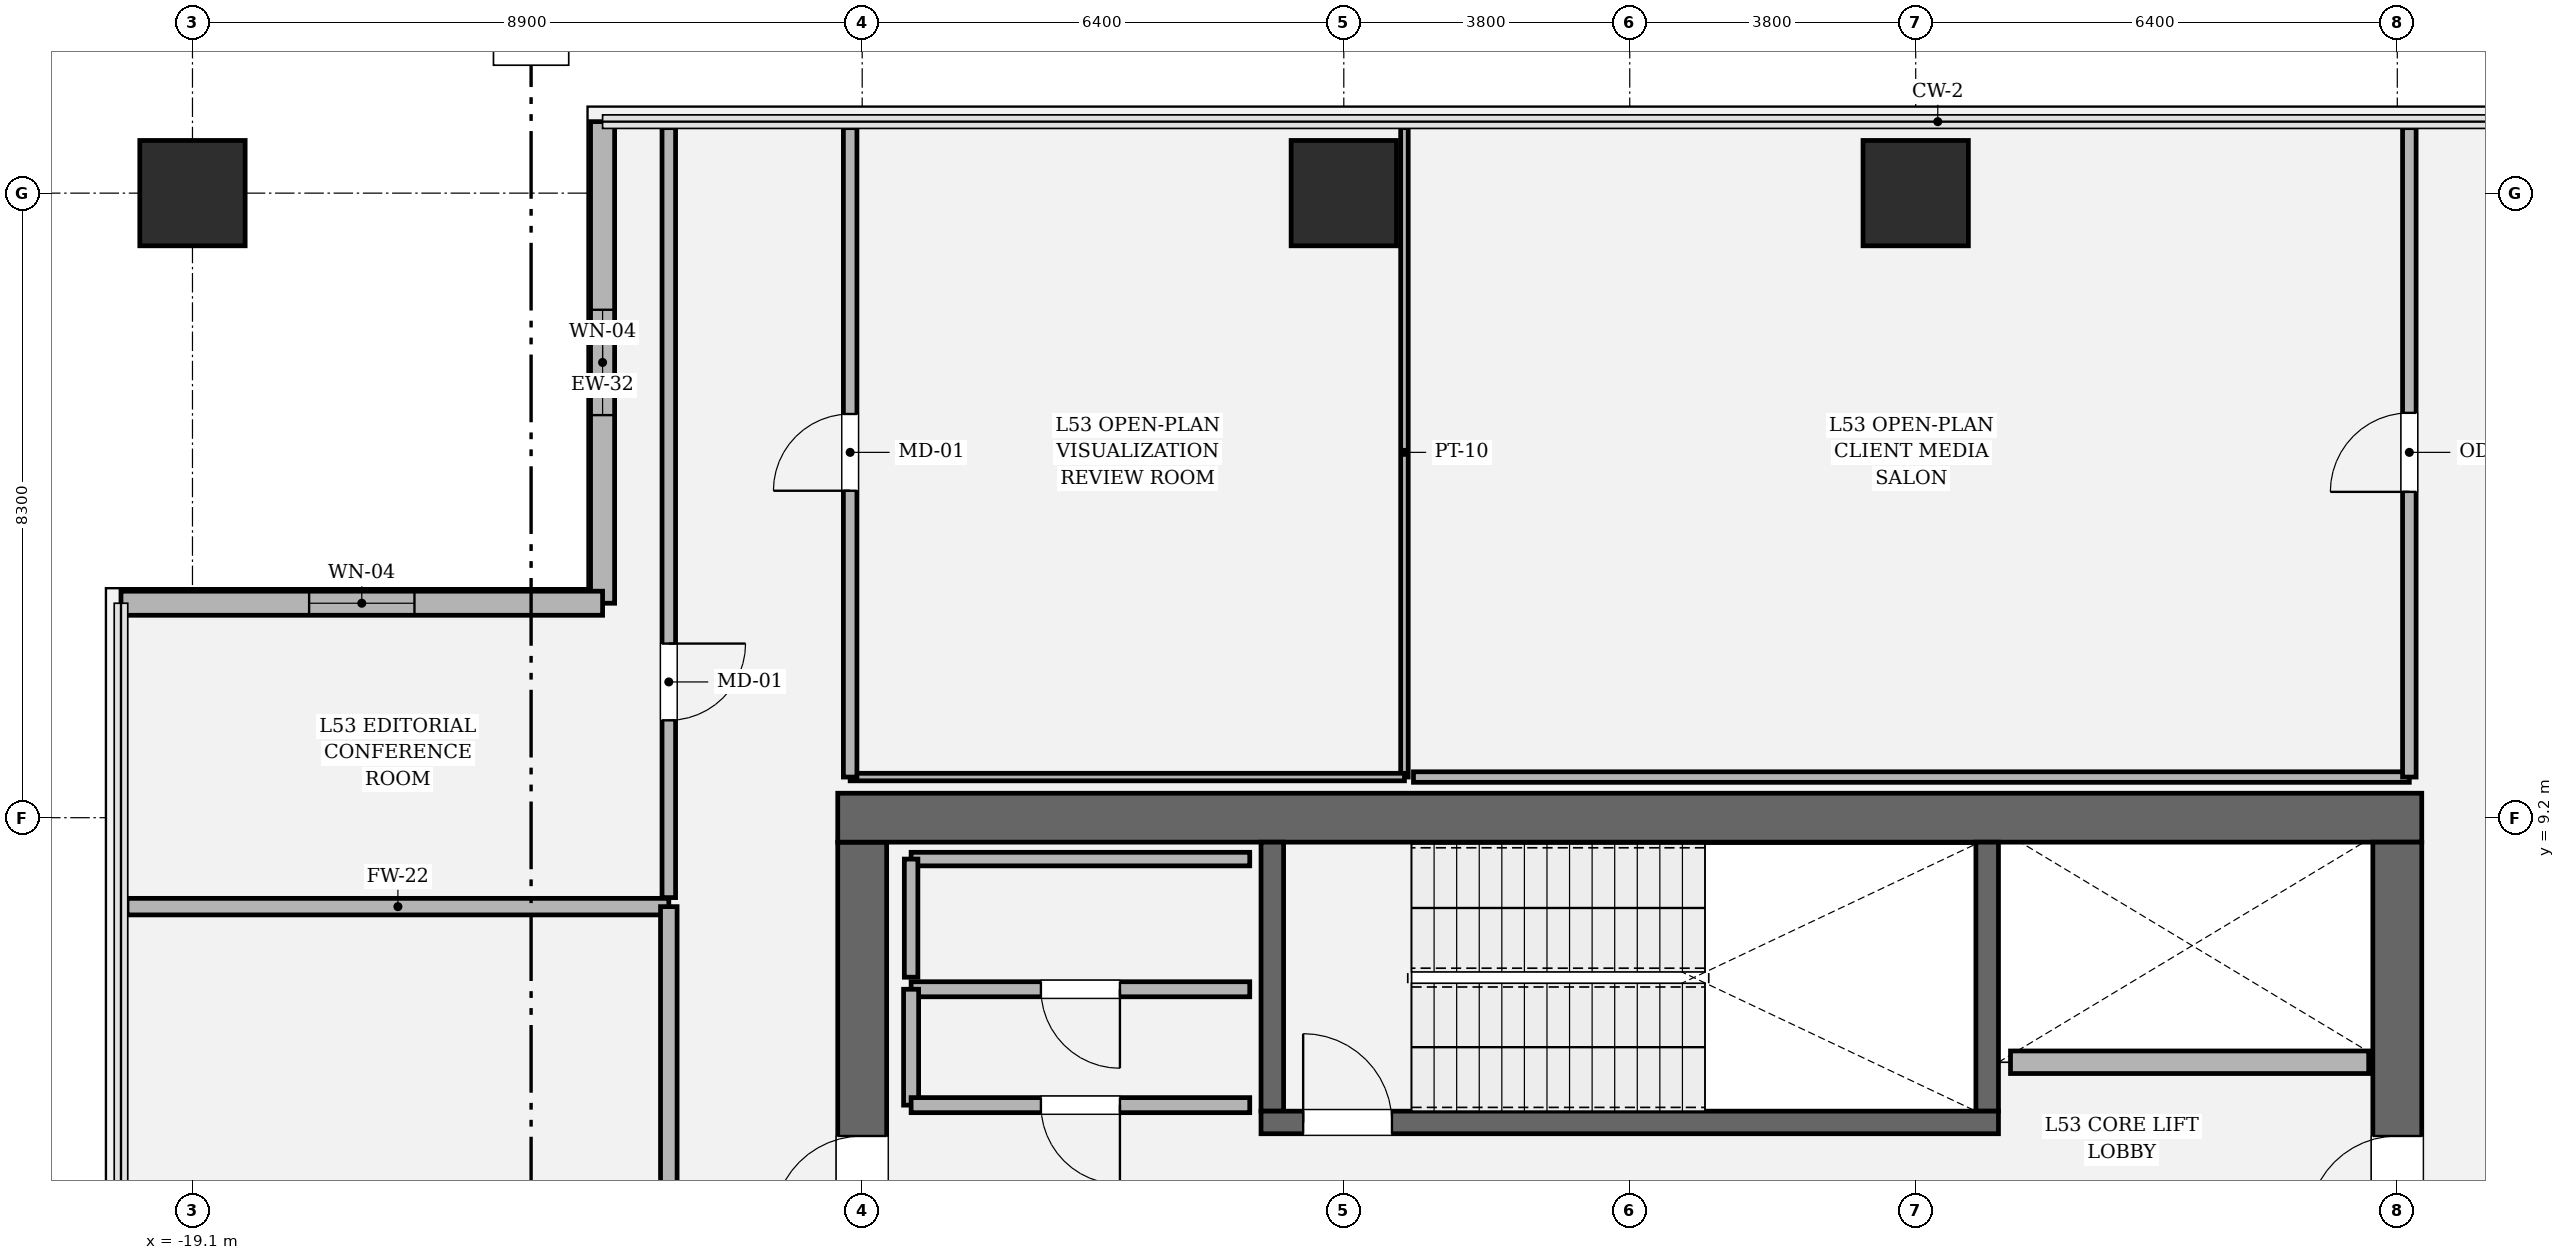
"""IFC4 building model, lengths in metres.
Left out: names, types, materials, properties, quantities, classifications, styles, units other than length and angle.
Written with IfcOpenShell. Run it as: python <this file> out.ifc"""

import sys

from ifc_helpers import new_model, si_unit, direction, frame, frame_2d, origin, origin_2d, place, context, subcontext, project, spatial, rectangle, hollow_rectangle, extrude, element, fill, save


model = new_model("IFC4")
c1 = context("Model", 3, precision=1e-05, world=origin(), true_north=direction((0.0, 1.0)))
c2 = subcontext(c1, "Body", "Model", "MODEL_VIEW")
j1 = project(units=[si_unit("LENGTHUNIT", "METRE"), si_unit("PLANEANGLEUNIT", "RADIAN")], contexts=[c1])
p1 = place(None, origin())
s1 = spatial("IfcSite", under=j1, at=p1, CompositionType="ELEMENT")
p2 = place(p1, origin())
s2 = spatial("IfcBuilding", under=s1, at=p2, CompositionType="ELEMENT")
p3 = place(p2, frame((0.0, 0.0, 224.85)))
s3 = spatial("IfcBuildingStorey", under=s2, at=p3, CompositionType="ELEMENT", Elevation=224.85)
p4 = place(p3, frame((-10.2, -8.875, 0.0), z_axis=(0.0, 0.0, 1.0), x_axis=(0.0, 1.0, 0.0)))
e1 = element("IfcWall", 1, at=p4, inside=s3, PredefinedType="SHEAR", context=c2, shape_type="SweptSolid", body=[
    extrude(rectangle(XDim=17.75, YDim=0.65, at=frame_2d((8.875, 0.0))), origin(), (0.0, 0.0, 1.0), 4.05),
])
p5 = place(p4, frame((12.665, 0.0, 0.0)))
e2 = element("IfcOpeningElement", 2, at=p5, cuts=e1, PredefinedType="OPENING", context=c2, shape_type="SweptSolid", body=[
    extrude(rectangle(XDim=1.18, YDim=2.2, at=frame_2d((0.59, 1.1))), frame((0.0, 0.335, 0.0), z_axis=(0.0, -1.0, 0.0), x_axis=(1.0, 0.0, 0.0)), (0.0, 0.0, 1.0), 0.67),
])
p6 = place(p3, frame((-10.525, 9.2, 0.0), z_axis=(0.0, 0.0, 1.0), x_axis=(1.0, 0.0, 0.0)))
e3 = element("IfcWall", 3, at=p6, inside=s3, PredefinedType="SHEAR", context=c2, shape_type="SweptSolid", body=[
    extrude(rectangle(XDim=21.05, YDim=0.65, at=frame_2d((10.525, 0.0))), origin(), (0.0, 0.0, 1.0), 4.05),
])
p7 = place(p3, frame((10.2, 8.875, 0.0), z_axis=(0.0, 0.0, 1.0), x_axis=(0.0, -1.0, 0.0)))
e4 = element("IfcWall", 4, at=p7, inside=s3, PredefinedType="SHEAR", context=c2, shape_type="SweptSolid", body=[
    extrude(rectangle(XDim=17.75, YDim=0.65, at=frame_2d((8.875, 0.0))), origin(), (0.0, 0.0, 1.0), 4.05),
])
p8 = place(p7, frame((3.905, 0.0, 0.0)))
e5 = element("IfcOpeningElement", 5, at=p8, cuts=e4, PredefinedType="OPENING", context=c2, shape_type="SweptSolid", body=[
    extrude(rectangle(XDim=1.18, YDim=2.2, at=frame_2d((0.59, 1.1))), frame((0.0, 0.335, 0.0), z_axis=(0.0, -1.0, 0.0), x_axis=(1.0, 0.0, 0.0)), (0.0, 0.0, 1.0), 0.67),
])
for number, where, z_axis, x_axis in (
    (6, (-4.75, 5.3, 0.0), (0.0, 0.0, 1.0), (0.0, 1.0, 0.0)),
    (7, (4.75, 8.875, 0.0), (0.0, 0.0, 1.0), (0.0, -1.0, 0.0)),
):
    element("IfcWall", number, at=place(p3, frame(where, z_axis=z_axis, x_axis=x_axis)), inside=s3, PredefinedType="SOLIDWALL", context=c2, shape_type="SweptSolid", body=[
        extrude(rectangle(XDim=3.575, YDim=0.3, at=frame_2d((1.788, 0.0))), origin(), (0.0, 0.0, 1.0), 4.05),
    ])
p9 = place(p3, frame((-4.9, 5.15, 0.0), z_axis=(0.0, 0.0, 1.0), x_axis=(1.0, 0.0, 0.0)))
e8 = element("IfcWall", 8, at=p9, inside=s3, PredefinedType="SOLIDWALL", context=c2, shape_type="SweptSolid", body=[
    extrude(rectangle(XDim=9.8, YDim=0.3, at=frame_2d((4.9, 0.0))), origin(), (0.0, 0.0, 1.0), 4.05),
])
p10 = place(p9, frame((0.56, 0.0, 0.0)))
e9 = element("IfcOpeningElement", 9, at=p10, cuts=e8, PredefinedType="OPENING", context=c2, shape_type="SweptSolid", body=[
    extrude(rectangle(XDim=1.18, YDim=2.2, at=frame_2d((0.59, 1.1))), frame((0.0, 0.16, 0.0), z_axis=(0.0, -1.0, 0.0), x_axis=(1.0, 0.0, 0.0)), (0.0, 0.0, 1.0), 0.32),
])
for number, where, z_axis, x_axis in (
    (10, (3.8, 17.5, 0.0), (0.0, 0.0, 1.0), (1.0, 0.0, 0.0)),
    (11, (-3.8, 17.5, 0.0), (0.0, 0.0, 1.0), (1.0, 0.0, 0.0)),
    (12, (-19.1, 17.5, 0.0), (0.0, 0.0, 1.0), (1.0, 0.0, 0.0)),
):
    element("IfcColumn", number, at=place(p3, frame(where, z_axis=z_axis, x_axis=x_axis)), inside=s3, PredefinedType="COLUMN", context=c2, shape_type="SweptSolid", body=[
        extrude(hollow_rectangle(XDim=1.4, YDim=1.4, WallThickness=0.042, at=origin_2d()), origin(), (0.0, 0.0, 1.0), 4.05),
    ])
p11 = place(p3, frame((-13.65, 18.45, 0.0), z_axis=(0.0, 0.0, 1.0), x_axis=(0.0, -1.0, 0.0)))
e13 = element("IfcWall", 13, at=p11, inside=s3, PredefinedType="SOLIDWALL", context=c2, shape_type="SweptSolid", body=[
    extrude(rectangle(XDim=6.4, YDim=0.32, at=frame_2d((3.2, 0.0))), origin(), (0.0, 0.0, 1.0), 3.174),
])
p12 = place(p11, frame((2.5, 0.0, 0.734)))
e14 = element("IfcOpeningElement", 14, at=p12, cuts=e13, PredefinedType="OPENING", context=c2, shape_type="SweptSolid", body=[
    extrude(rectangle(XDim=1.4, YDim=2.2, at=frame_2d((0.7, 1.1))), frame((0.0, 0.17, 0.0), z_axis=(0.0, -1.0, 0.0), x_axis=(1.0, 0.0, 0.0)), (0.0, 0.0, 1.0), 0.34),
])
p13 = place(p3, frame((-13.65, 12.05, 0.0), z_axis=(0.0, 0.0, 1.0), x_axis=(-1.0, 0.0, 0.0)))
e15 = element("IfcWall", 15, at=p13, inside=s3, PredefinedType="SOLIDWALL", context=c2, shape_type="SweptSolid", body=[
    extrude(rectangle(XDim=6.4, YDim=0.32, at=frame_2d((3.2, 0.0))), origin(), (0.0, 0.0, 1.0), 3.174),
])
p14 = place(p13, frame((2.5, 0.0, 0.734)))
e16 = element("IfcOpeningElement", 16, at=p14, cuts=e15, PredefinedType="OPENING", context=c2, shape_type="SweptSolid", body=[
    extrude(rectangle(XDim=1.4, YDim=2.2, at=frame_2d((0.7, 1.1))), frame((0.0, 0.17, 0.0), z_axis=(0.0, -1.0, 0.0), x_axis=(1.0, 0.0, 0.0)), (0.0, 0.0, 1.0), 0.34),
])
p15 = place(p3, frame((5.06, 5.95, 0.0), z_axis=(0.0, 0.0, 1.0), x_axis=(1.0, 0.0, 0.0)))
e17 = element("IfcWall", 17, at=p15, inside=s3, PredefinedType="SOLIDWALL", context=c2, shape_type="SweptSolid", body=[
    extrude(rectangle(XDim=4.76, YDim=0.3, at=frame_2d((2.38, 0.0))), origin(), (0.0, 0.0, 1.0), 3.83),
])
p16 = place(p3, frame((-5.05, 6.92, 0.0), z_axis=(0.0, 0.0, 1.0), x_axis=(-1.0, 0.0, 0.0)))
e18 = element("IfcWall", 18, at=p16, inside=s3, PredefinedType="SOLIDWALL", context=c2, shape_type="SweptSolid", body=[
    extrude(rectangle(XDim=4.5, YDim=0.2, at=frame_2d((2.25, 0.0))), origin(), (0.0, 0.0, 1.0), 3.83),
])
p17 = place(p16, frame((1.725, 0.0, 0.0)))
e19 = element("IfcOpeningElement", 19, at=p17, cuts=e18, PredefinedType="OPENING", context=c2, shape_type="SweptSolid", body=[
    extrude(rectangle(XDim=1.05, YDim=2.2, at=frame_2d((0.525, 1.1))), frame((0.0, 0.11, 0.0), z_axis=(0.0, -1.0, 0.0), x_axis=(1.0, 0.0, 0.0)), (0.0, 0.0, 1.0), 0.22),
])
p18 = place(p3, frame((-9.55, 6.92, 0.0), z_axis=(0.0, 0.0, 1.0), x_axis=(0.0, -1.0, 0.0)))
e20 = element("IfcWall", 20, at=p18, inside=s3, PredefinedType="SOLIDWALL", context=c2, shape_type="SweptSolid", body=[
    extrude(rectangle(XDim=1.54, YDim=0.2, at=frame_2d((0.77, 0.0))), origin(), (0.0, 0.0, 1.0), 3.83),
])
p19 = place(p3, frame((-9.55, 5.38, 0.0), z_axis=(0.0, 0.0, 1.0), x_axis=(1.0, 0.0, 0.0)))
e21 = element("IfcWall", 21, at=p19, inside=s3, PredefinedType="SOLIDWALL", context=c2, shape_type="SweptSolid", body=[
    extrude(rectangle(XDim=4.5, YDim=0.2, at=frame_2d((2.25, 0.0))), origin(), (0.0, 0.0, 1.0), 3.83),
])
p20 = place(p19, frame((1.725, 0.0, 0.0)))
e22 = element("IfcOpeningElement", 22, at=p20, cuts=e21, PredefinedType="OPENING", context=c2, shape_type="SweptSolid", body=[
    extrude(rectangle(XDim=1.05, YDim=2.2, at=frame_2d((0.525, 1.1))), frame((0.0, 0.11, 0.0), z_axis=(0.0, -1.0, 0.0), x_axis=(1.0, 0.0, 0.0)), (0.0, 0.0, 1.0), 0.22),
])
p21 = place(p3, frame((-5.05, 8.65, 0.0), z_axis=(0.0, 0.0, 1.0), x_axis=(-1.0, 0.0, 0.0)))
e23 = element("IfcWall", 23, at=p21, inside=s3, PredefinedType="PARTITIONING", context=c2, shape_type="SweptSolid", body=[
    extrude(rectangle(XDim=4.5, YDim=0.18, at=frame_2d((2.25, 0.0))), origin(), (0.0, 0.0, 1.0), 3.83),
])
p22 = place(p3, frame((-9.55, 8.65, 0.0), z_axis=(0.0, 0.0, 1.0), x_axis=(0.0, -1.0, 0.0)))
e24 = element("IfcWall", 24, at=p22, inside=s3, PredefinedType="PARTITIONING", context=c2, shape_type="SweptSolid", body=[
    extrude(rectangle(XDim=1.57, YDim=0.18, at=frame_2d((0.785, 0.0))), origin(), (0.0, 0.0, 1.0), 3.83),
])
p23 = place(p3, frame((-19.97, 8.018, 0.0), z_axis=(0.0, 0.0, 1.0), x_axis=(1.0, 0.0, 0.0)))
e25 = element("IfcWall", 25, at=p23, inside=s3, PredefinedType="SOLIDWALL", context=c2, shape_type="SweptSolid", body=[
    extrude(rectangle(XDim=7.2, YDim=0.22, at=frame_2d((3.6, 0.0))), origin(), (0.0, 0.0, 1.0), 3.174),
])
p24 = place(p3, frame((-12.77, 8.018, 0.0), z_axis=(0.0, 0.0, 1.0), x_axis=(0.0, -1.0, 0.0)))
e26 = element("IfcWall", 26, at=p24, inside=s3, PredefinedType="SOLIDWALL", context=c2, shape_type="SweptSolid", body=[
    extrude(rectangle(XDim=10.26, YDim=0.22, at=frame_2d((5.13, 0.0))), origin(), (0.0, 0.0, 1.0), 3.174),
])
p25 = place(p24, frame((4.58, 0.0, 0.0)))
e27 = element("IfcOpeningElement", 27, at=p25, cuts=e26, PredefinedType="OPENING", context=c2, shape_type="SweptSolid", body=[
    extrude(rectangle(XDim=1.1, YDim=2.2, at=frame_2d((0.55, 1.1))), frame((0.0, 0.12, 0.0), z_axis=(0.0, -1.0, 0.0), x_axis=(1.0, 0.0, 0.0)), (0.0, 0.0, 1.0), 0.24),
])
p26 = place(p3, frame((-12.77, 18.37, 0.0), z_axis=(0.0, 0.0, 1.0), x_axis=(0.0, -1.0, 0.0)))
e28 = element("IfcWall", 28, at=p26, inside=s3, PredefinedType="PARTITIONING", context=c2, shape_type="SweptSolid", body=[
    extrude(rectangle(XDim=10.232, YDim=0.18, at=frame_2d((5.116, 0.0))), origin(), (0.0, 0.0, 1.0), 3.174),
])
p27 = place(p26, frame((6.856, 0.0, 0.0)))
e29 = element("IfcOpeningElement", 29, at=p27, cuts=e28, PredefinedType="OPENING", context=c2, shape_type="SweptSolid", body=[
    extrude(rectangle(XDim=1.02, YDim=2.2, at=frame_2d((0.51, 1.1))), frame((0.0, 0.1, 0.0), z_axis=(0.0, -1.0, 0.0), x_axis=(1.0, 0.0, 0.0)), (0.0, 0.0, 1.0), 0.2),
])
p28 = place(p3, frame((-2.994, 18.37, 0.0), z_axis=(0.0, 0.0, 1.0), x_axis=(0.0, -1.0, 0.0)))
e30 = element("IfcWall", 30, at=p28, inside=s3, PredefinedType="PARTITIONING", context=c2, shape_type="SweptSolid", body=[
    extrude(rectangle(XDim=8.63, YDim=0.1, at=frame_2d((4.315, 0.0))), origin(), (0.0, 0.0, 1.0), 3.174),
])
p29 = place(p3, frame((-2.994, 9.74, 0.0), z_axis=(0.0, 0.0, 1.0), x_axis=(-1.0, 0.0, 0.0)))
e31 = element("IfcWall", 31, at=p29, inside=s3, PredefinedType="PARTITIONING", context=c2, shape_type="SweptSolid", body=[
    extrude(rectangle(XDim=7.366, YDim=0.1, at=frame_2d((3.683, 0.0))), origin(), (0.0, 0.0, 1.0), 3.174),
])
p30 = place(p3, frame((-10.36, 9.74, 0.0), z_axis=(0.0, 0.0, 1.0), x_axis=(0.0, 1.0, 0.0)))
e32 = element("IfcWall", 32, at=p30, inside=s3, PredefinedType="PARTITIONING", context=c2, shape_type="SweptSolid", body=[
    extrude(rectangle(XDim=8.63, YDim=0.18, at=frame_2d((4.315, 0.0))), origin(), (0.0, 0.0, 1.0), 3.174),
])
p31 = place(p30, frame((3.805, 0.0, 0.0)))
e33 = element("IfcOpeningElement", 33, at=p31, cuts=e32, PredefinedType="OPENING", context=c2, shape_type="SweptSolid", body=[
    extrude(rectangle(XDim=1.02, YDim=2.2, at=frame_2d((0.51, 1.1))), frame((0.0, 0.1, 0.0), z_axis=(0.0, -1.0, 0.0), x_axis=(1.0, 0.0, 0.0)), (0.0, 0.0, 1.0), 0.2),
])
p32 = place(p3, frame((10.36, 9.74, 0.0), z_axis=(0.0, 0.0, 1.0), x_axis=(-1.0, 0.0, 0.0)))
e34 = element("IfcWall", 34, at=p32, inside=s3, PredefinedType="PARTITIONING", context=c2, shape_type="SweptSolid", body=[
    extrude(rectangle(XDim=13.234, YDim=0.14, at=frame_2d((6.617, 0.0))), origin(), (0.0, 0.0, 1.0), 3.174),
])
p33 = place(p3, frame((10.36, 18.37, 0.0), z_axis=(0.0, 0.0, 1.0), x_axis=(0.0, -1.0, 0.0)))
e35 = element("IfcWall", 35, at=p33, inside=s3, PredefinedType="PARTITIONING", context=c2, shape_type="SweptSolid", body=[
    extrude(rectangle(XDim=8.63, YDim=0.18, at=frame_2d((4.315, 0.0))), origin(), (0.0, 0.0, 1.0), 3.174),
])
p34 = place(p33, frame((3.79, 0.0, 0.0)))
e36 = element("IfcOpeningElement", 36, at=p34, cuts=e35, PredefinedType="OPENING", context=c2, shape_type="SweptSolid", body=[
    extrude(rectangle(XDim=1.05, YDim=2.2, at=frame_2d((0.525, 1.1))), frame((0.0, 0.1, 0.0), z_axis=(0.0, -1.0, 0.0), x_axis=(1.0, 0.0, 0.0)), (0.0, 0.0, 1.0), 0.2),
])
p35 = place(p12, origin())
e37 = element("IfcWindow", 37, at=p35, inside=s3, PartitioningType="SINGLE_PANEL", PredefinedType="WINDOW", context=c2, shape_type="SweptSolid", body=[
    extrude(rectangle(XDim=1.4, YDim=2.2, at=frame_2d((0.7, 1.1))), frame((0.0, 0.03, 0.0), z_axis=(0.0, -1.0, 0.0), x_axis=(1.0, 0.0, 0.0)), (0.0, 0.0, 1.0), 0.06),
])
fill(e14, e37)
p36 = place(p14, origin())
e38 = element("IfcWindow", 38, at=p36, inside=s3, PartitioningType="SINGLE_PANEL", PredefinedType="WINDOW", context=c2, shape_type="SweptSolid", body=[
    extrude(rectangle(XDim=1.4, YDim=2.2, at=frame_2d((0.7, 1.1))), frame((0.0, 0.03, 0.0), z_axis=(0.0, -1.0, 0.0), x_axis=(1.0, 0.0, 0.0)), (0.0, 0.0, 1.0), 0.06),
])
fill(e16, e38)
p37 = place(p10, origin())
e39 = element("IfcDoor", 39, at=p37, inside=s3, OperationType="SINGLE_SWING_LEFT", PredefinedType="DOOR", context=c2, shape_type="SweptSolid", body=[
    extrude(rectangle(XDim=1.18, YDim=2.2, at=frame_2d((0.59, 1.1))), frame((0.0, 0.025, 0.0), z_axis=(0.0, -1.0, 0.0), x_axis=(1.0, 0.0, 0.0)), (0.0, 0.0, 1.0), 0.05),
])
fill(e9, e39)
p38 = place(p5, origin())
e40 = element("IfcDoor", 40, at=p38, inside=s3, OperationType="SINGLE_SWING_LEFT", PredefinedType="DOOR", context=c2, shape_type="SweptSolid", body=[
    extrude(rectangle(XDim=1.18, YDim=2.2, at=frame_2d((0.59, 1.1))), frame((0.0, 0.025, 0.0), z_axis=(0.0, -1.0, 0.0), x_axis=(1.0, 0.0, 0.0)), (0.0, 0.0, 1.0), 0.05),
])
fill(e2, e40)
p39 = place(p8, origin())
e41 = element("IfcDoor", 41, at=p39, inside=s3, OperationType="SINGLE_SWING_RIGHT", PredefinedType="DOOR", context=c2, shape_type="SweptSolid", body=[
    extrude(rectangle(XDim=1.18, YDim=2.2, at=frame_2d((0.59, 1.1))), frame((0.0, 0.025, 0.0), z_axis=(0.0, -1.0, 0.0), x_axis=(1.0, 0.0, 0.0)), (0.0, 0.0, 1.0), 0.05),
])
fill(e5, e41)
p40 = place(p20, origin())
e42 = element("IfcDoor", 42, at=p40, inside=s3, OperationType="SINGLE_SWING_RIGHT", PredefinedType="DOOR", context=c2, shape_type="SweptSolid", body=[
    extrude(rectangle(XDim=1.05, YDim=2.2, at=frame_2d((0.525, 1.1))), frame((0.0, 0.025, 0.0), z_axis=(0.0, -1.0, 0.0), x_axis=(1.0, 0.0, 0.0)), (0.0, 0.0, 1.0), 0.05),
])
fill(e22, e42)
p41 = place(p17, origin())
e43 = element("IfcDoor", 43, at=p41, inside=s3, OperationType="SINGLE_SWING_LEFT", PredefinedType="DOOR", context=c2, shape_type="SweptSolid", body=[
    extrude(rectangle(XDim=1.05, YDim=2.2, at=frame_2d((0.525, 1.1))), frame((0.0, 0.025, 0.0), z_axis=(0.0, -1.0, 0.0), x_axis=(1.0, 0.0, 0.0)), (0.0, 0.0, 1.0), 0.05),
])
fill(e19, e43)
p42 = place(p27, origin())
e44 = element("IfcDoor", 44, at=p42, inside=s3, OperationType="SINGLE_SWING_LEFT", PredefinedType="DOOR", context=c2, shape_type="SweptSolid", body=[
    extrude(rectangle(XDim=1.02, YDim=2.2, at=frame_2d((0.51, 1.1))), frame((0.0, 0.025, 0.0), z_axis=(0.0, -1.0, 0.0), x_axis=(1.0, 0.0, 0.0)), (0.0, 0.0, 1.0), 0.05),
])
fill(e29, e44)
p43 = place(p31, origin())
e45 = element("IfcDoor", 45, at=p43, inside=s3, OperationType="SINGLE_SWING_LEFT", PredefinedType="DOOR", context=c2, shape_type="SweptSolid", body=[
    extrude(rectangle(XDim=1.02, YDim=2.2, at=frame_2d((0.51, 1.1))), frame((0.0, 0.025, 0.0), z_axis=(0.0, -1.0, 0.0), x_axis=(1.0, 0.0, 0.0)), (0.0, 0.0, 1.0), 0.05),
])
fill(e33, e45)
p44 = place(p34, origin())
e46 = element("IfcDoor", 46, at=p44, inside=s3, OperationType="SINGLE_SWING_RIGHT", PredefinedType="DOOR", context=c2, shape_type="SweptSolid", body=[
    extrude(rectangle(XDim=1.05, YDim=2.2, at=frame_2d((0.525, 1.1))), frame((0.0, 0.025, 0.0), z_axis=(0.0, -1.0, 0.0), x_axis=(1.0, 0.0, 0.0)), (0.0, 0.0, 1.0), 0.05),
])
fill(e36, e46)
save(model, sys.argv[1])
